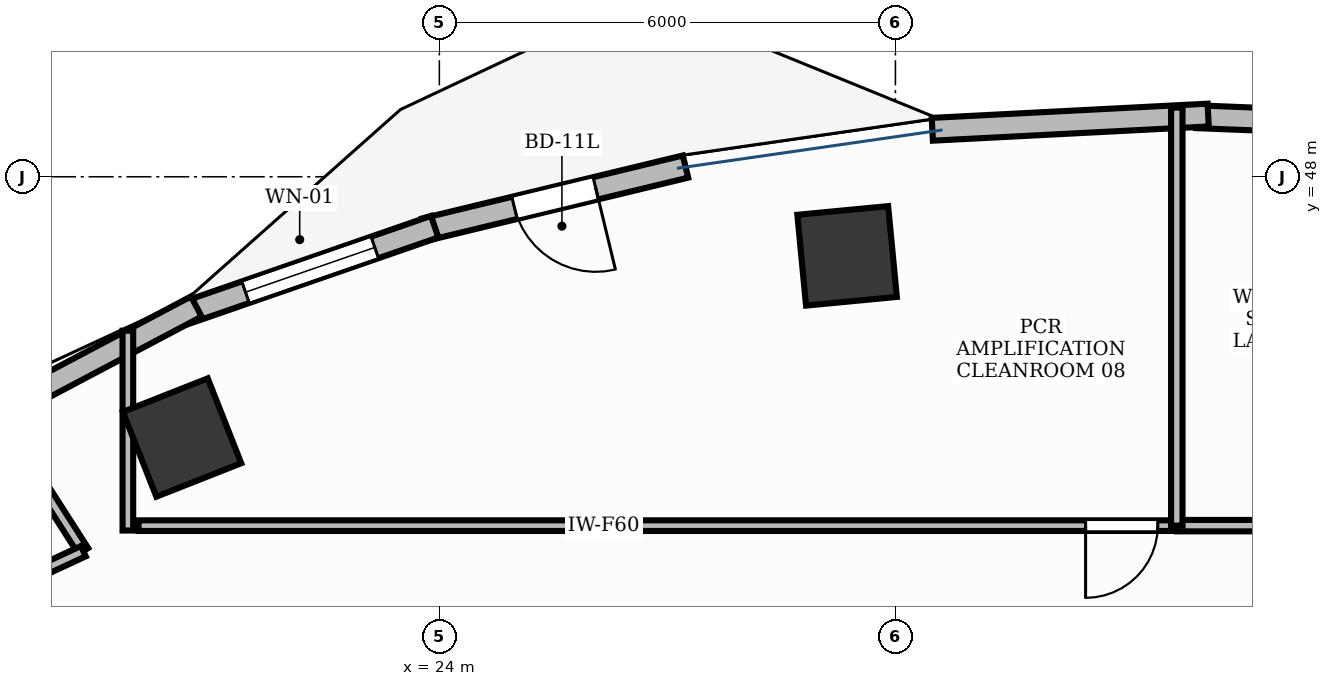
"""IFC4 building model, lengths in metres.
Left out: names, types, materials, properties, quantities, classifications, styles, units other than length and angle.
Written with IfcOpenShell. Run it as: python <this file> out.ifc"""

import sys

from ifc_helpers import new_model, si_unit, direction, frame, frame_2d, origin, origin_2d, place, context, subcontext, project, spatial, rectangle, extrude, element, fill, save


model = new_model("IFC4")
c1 = context("Model", 3, precision=1e-05, world=origin(), true_north=direction((0.0, 1.0)))
c2 = subcontext(c1, "Body", "Model", "MODEL_VIEW")
j1 = project(units=[si_unit("LENGTHUNIT", "METRE"), si_unit("PLANEANGLEUNIT", "RADIAN")], contexts=[c1])
p1 = place(None, origin())
s1 = spatial("IfcSite", under=j1, at=p1, CompositionType="ELEMENT")
p2 = place(p1, origin())
s2 = spatial("IfcBuilding", under=s1, at=p2, CompositionType="ELEMENT")
p3 = place(p2, frame((0.0, 0.0, 102.6)))
s3 = spatial("IfcBuildingStorey", under=s2, at=p3, CompositionType="ELEMENT", Elevation=102.6)
for number, where, z_axis, x_axis in (
    (1, (29.364, 46.959, -0.0), (0.0, 0.0, 1.0), (0.995, 0.095, 0.0)),
    (2, (20.615, 44.569, -0.0), (0.0, 0.0, 1.0), (0.93, 0.367, 0.0)),
):
    element("IfcColumn", number, at=place(p3, frame(where, z_axis=z_axis, x_axis=x_axis)), inside=s3, PredefinedType="COLUMN", context=c2, shape_type="SweptSolid", body=[
        extrude(rectangle(XDim=1.2, YDim=1.2, at=origin_2d()), origin(), (0.0, 0.0, 1.0), 3.901),
    ])
p4 = place(p3, frame((37.554, 48.647, 0.0), z_axis=(0.0, 0.0, 1.0), x_axis=(-0.999210691503, 0.039723972445, 0.0)))
e3 = element("IfcWall", 3, at=p4, inside=s3, PredefinedType="STANDARD", context=c2, shape_type="SweptSolid", body=[
    extrude(rectangle(XDim=3.595, YDim=0.3, at=frame_2d((1.798, 0.0))), origin(), (0.0, 0.0, 1.0), 3.9),
])
p5 = place(p4, frame((0.898, 0.0, 0.9)))
e4 = element("IfcOpeningElement", 4, at=p5, cuts=e3, PredefinedType="OPENING", context=c2, shape_type="SweptSolid", body=[
    extrude(rectangle(XDim=1.8, YDim=2.1, at=frame_2d((0.9, 1.05))), frame((0.0, 0.165, 0.0), z_axis=(0.0, -1.0, 0.0), x_axis=(1.0, 0.0, 0.0)), (0.0, 0.0, 1.0), 0.33),
])
p6 = place(p3, frame((27.238, 48.134, 0.0), z_axis=(0.0, 0.0, 1.0), x_axis=(-0.972049000874, -0.234778065203, 0.0)))
e5 = element("IfcWall", 5, at=p6, inside=s3, PredefinedType="STANDARD", context=c2, shape_type="SweptSolid", body=[
    extrude(rectangle(XDim=3.528, YDim=0.3, at=frame_2d((1.764, 0.0))), origin(), (0.0, 0.0, 1.0), 3.9),
])
p7 = place(p6, frame((1.214, 0.0, 0.0)))
e6 = element("IfcOpeningElement", 6, at=p7, cuts=e5, PredefinedType="OPENING", context=c2, shape_type="SweptSolid", body=[
    extrude(rectangle(XDim=1.1, YDim=2.15, at=frame_2d((0.55, 1.075))), frame((0.0, 0.165, 0.0), z_axis=(0.0, -1.0, 0.0), x_axis=(1.0, 0.0, 0.0)), (0.0, 0.0, 1.0), 0.33),
])
p8 = place(p3, frame((23.938, 47.343, 0.0), z_axis=(0.0, 0.0, 1.0), x_axis=(-0.944878029854, -0.3274225232, 0.0)))
e7 = element("IfcWall", 7, at=p8, inside=s3, PredefinedType="STANDARD", context=c2, shape_type="SweptSolid", body=[
    extrude(rectangle(XDim=3.467, YDim=0.3, at=frame_2d((1.734, 0.0))), origin(), (0.0, 0.0, 1.0), 3.9),
])
p9 = place(p8, frame((0.834, 0.0, 0.9)))
e8 = element("IfcOpeningElement", 8, at=p9, cuts=e7, PredefinedType="OPENING", context=c2, shape_type="SweptSolid", body=[
    extrude(rectangle(XDim=1.8, YDim=2.1, at=frame_2d((0.9, 1.05))), frame((0.0, 0.165, 0.0), z_axis=(0.0, -1.0, 0.0), x_axis=(1.0, 0.0, 0.0)), (0.0, 0.0, 1.0), 0.33),
])
p10 = place(p3, frame((34.115, 48.812, 0.0), z_axis=(0.0, 0.0, 1.0), x_axis=(-0.998674767218, -0.051465613004, 0.0)))
e9 = element("IfcWall", 9, at=p10, inside=s3, PredefinedType="STANDARD", context=c2, shape_type="SweptSolid", body=[
    extrude(rectangle(XDim=3.634, YDim=0.3, at=frame_2d((1.817, 0.0))), origin(), (0.0, 0.0, 1.0), 3.9),
])
p11 = place(p3, frame((20.802, 46.292, 0.0), z_axis=(0.0, 0.0, 1.0), x_axis=(-0.883986649445, -0.467512142734, 0.0)))
e10 = element("IfcWall", 10, at=p11, inside=s3, PredefinedType="STANDARD", context=c2, shape_type="SweptSolid", body=[
    extrude(rectangle(XDim=6.601, YDim=0.3, at=frame_2d((3.301, 0.0))), origin(), (0.0, 0.0, 1.0), 3.47),
])
p12 = place(p3, frame((36.485, 43.41, 0.0), z_axis=(0.0, 0.0, 1.0), x_axis=(-1.0, 0.0, 0.0)))
e11 = element("IfcWall", 11, at=p12, inside=s3, PredefinedType="PARTITIONING", context=c2, shape_type="SweptSolid", body=[
    extrude(rectangle(XDim=2.783, YDim=0.15, at=frame_2d((1.392, 0.0))), origin(), (0.0, 0.0, 1.0), 2.91),
])
p13 = place(p12, frame((0.24, 0.0, 0.0)))
e12 = element("IfcOpeningElement", 12, at=p13, cuts=e11, PredefinedType="OPENING", context=c2, shape_type="SweptSolid", body=[
    extrude(rectangle(XDim=0.95, YDim=2.15, at=frame_2d((0.475, 1.075))), frame((0.0, 0.09, 0.0), z_axis=(0.0, -1.0, 0.0), x_axis=(1.0, 0.0, 0.0)), (0.0, 0.0, 1.0), 0.18),
])
p14 = place(p3, frame((33.692, 43.41, 0.0), z_axis=(0.0, 0.0, 1.0), x_axis=(-1.0, 0.0, 0.0)))
e13 = element("IfcWall", 13, at=p14, inside=s3, PredefinedType="PARTITIONING", context=c2, shape_type="SweptSolid", body=[
    extrude(rectangle(XDim=13.649, YDim=0.14, at=frame_2d((6.825, 0.0))), origin(), (0.0, 0.0, 1.0), 2.91),
])
p15 = place(p14, frame((0.24, 0.0, 0.0)))
e14 = element("IfcOpeningElement", 14, at=p15, cuts=e13, PredefinedType="OPENING", context=c2, shape_type="SweptSolid", body=[
    extrude(rectangle(XDim=0.95, YDim=2.15, at=frame_2d((0.475, 1.075))), frame((0.0, 0.085, 0.0), z_axis=(0.0, -1.0, 0.0), x_axis=(1.0, 0.0, 0.0)), (0.0, 0.0, 1.0), 0.17),
])
p16 = place(p3, frame((18.006, 45.121, 0.0), z_axis=(0.0, 0.0, 1.0), x_axis=(0.539162038825, -0.842202051701, 0.0)))
e15 = element("IfcWall", 15, at=p16, inside=s3, PredefinedType="PARTITIONING", context=c2, shape_type="SweptSolid", body=[
    extrude(rectangle(XDim=2.43, YDim=0.15, at=frame_2d((1.215, 0.0))), origin(), (0.0, 0.0, 1.0), 2.91),
])
p17 = place(p3, frame((19.316, 43.074, 0.0), z_axis=(0.0, 0.0, 1.0), x_axis=(-0.907141981017, -0.420824697799, 0.0)))
e16 = element("IfcWall", 16, at=p17, inside=s3, PredefinedType="PARTITIONING", context=c2, shape_type="SweptSolid", body=[
    extrude(rectangle(XDim=0.526, YDim=0.15, at=frame_2d((0.263, 0.0))), origin(), (0.0, 0.0, 1.0), 2.91),
])
p18 = place(p3, frame((33.702, 43.41, 0.0), z_axis=(0.0, 0.0, 1.0), x_axis=(0.0, 1.0, 0.0)))
e17 = element("IfcWall", 17, at=p18, inside=s3, PredefinedType="PARTITIONING", context=c2, shape_type="SweptSolid", body=[
    extrude(rectangle(XDim=5.5, YDim=0.15, at=frame_2d((2.75, 0.0))), origin(), (0.0, 0.0, 1.0), 2.91),
])
p19 = place(p3, frame((19.902, 43.346, 0.0), z_axis=(0.0, 0.0, 1.0), x_axis=(0.0, 1.0, 0.0)))
e18 = element("IfcWall", 18, at=p19, inside=s3, PredefinedType="PARTITIONING", context=c2, shape_type="SweptSolid", body=[
    extrude(rectangle(XDim=2.629, YDim=0.14, at=frame_2d((1.314, 0.0))), origin(), (0.0, 0.0, 1.0), 2.91),
])
p20 = place(p7, origin())
e19 = element("IfcDoor", 19, at=p20, inside=s3, OperationType="SINGLE_SWING_LEFT", PredefinedType="DOOR", context=c2, shape_type="SweptSolid", body=[
    extrude(rectangle(XDim=1.1, YDim=2.15, at=frame_2d((0.55, 1.075))), frame((0.0, 0.025, 0.0), z_axis=(0.0, -1.0, 0.0), x_axis=(1.0, 0.0, 0.0)), (0.0, 0.0, 1.0), 0.05),
])
fill(e6, e19)
p21 = place(p9, origin())
e20 = element("IfcWindow", 20, at=p21, inside=s3, PartitioningType="SINGLE_PANEL", PredefinedType="WINDOW", context=c2, shape_type="SweptSolid", body=[
    extrude(rectangle(XDim=1.8, YDim=2.1, at=frame_2d((0.9, 1.05))), frame((0.0, 0.03, 0.0), z_axis=(0.0, -1.0, 0.0), x_axis=(1.0, 0.0, 0.0)), (0.0, 0.0, 1.0), 0.06),
])
fill(e8, e20)
p22 = place(p15, origin())
e21 = element("IfcDoor", 21, at=p22, inside=s3, OperationType="SINGLE_SWING_RIGHT", PredefinedType="DOOR", context=c2, shape_type="SweptSolid", body=[
    extrude(rectangle(XDim=0.95, YDim=2.15, at=frame_2d((0.475, 1.075))), frame((0.0, 0.025, 0.0), z_axis=(0.0, -1.0, 0.0), x_axis=(1.0, 0.0, 0.0)), (0.0, 0.0, 1.0), 0.05),
])
fill(e14, e21)
save(model, sys.argv[1])
